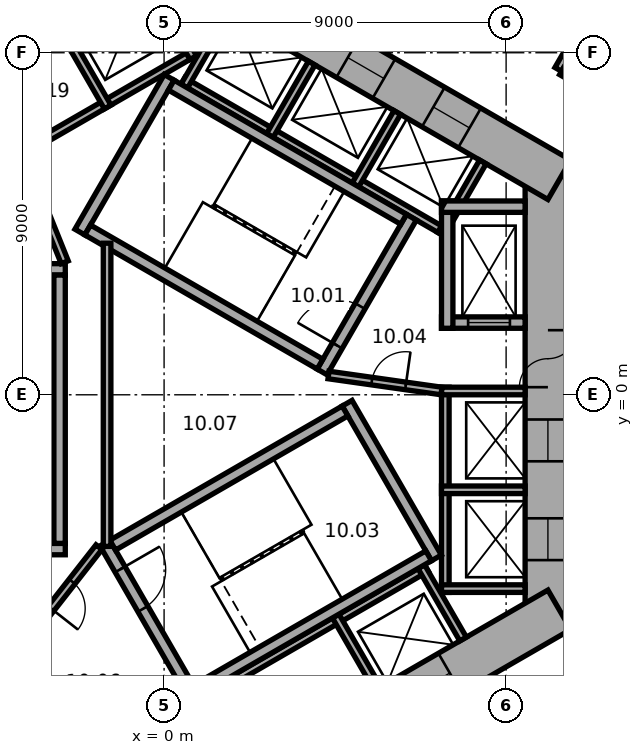
"""IFC4 building model, lengths in metres.
Left out: names, types, materials, properties, quantities, classifications, styles, units other than length and angle.
Written with IfcOpenShell. Run it as: python <this file> out.ifc"""

import sys

from ifc_helpers import new_model, si_unit, direction, frame, frame_2d, origin, place, context, subcontext, project, spatial, rectangle, extrude, element, fill, save


model = new_model("IFC4")
c1 = context("Model", 3, precision=1e-05, world=origin(), true_north=direction((0.0, 1.0)))
c2 = subcontext(c1, "Body", "Model", "MODEL_VIEW")
j1 = project(units=[si_unit("LENGTHUNIT", "METRE"), si_unit("PLANEANGLEUNIT", "RADIAN")], contexts=[c1])
p1 = place(None, origin())
s1 = spatial("IfcSite", under=j1, at=p1, CompositionType="ELEMENT")
p2 = place(p1, origin())
s2 = spatial("IfcBuilding", under=s1, at=p2, CompositionType="ELEMENT")
p3 = place(p2, frame((0.0, 0.0, 53.9)))
s3 = spatial("IfcBuildingStorey", under=s2, at=p3, CompositionType="ELEMENT", Elevation=53.9)
p4 = place(p3, frame((10.1, -6.177, 0.0), z_axis=(0.0, 0.0, 1.0), x_axis=(0.0, 1.0, 0.0)))
e1 = element("IfcWall", 1, at=p4, inside=s3, PredefinedType="SHEAR", context=c2, shape_type="SweptSolid", body=[
    extrude(rectangle(XDim=12.355, YDim=1.2, at=frame_2d((6.177, 0.0))), origin(), (0.0, 0.0, 1.0), 3.3),
])
p5 = place(p4, frame((6.378, 0.0, 0.0)))
e2 = element("IfcOpeningElement", 2, at=p5, cuts=e1, PredefinedType="OPENING", context=c2, shape_type="SweptSolid", body=[
    extrude(rectangle(XDim=1.5, YDim=2.1, at=frame_2d((0.75, 1.05))), frame((0.0, 0.61, 0.0), z_axis=(0.0, -1.0, 0.0), x_axis=(1.0, 0.0, 0.0)), (0.0, 0.0, 1.0), 1.22),
])
p6 = place(p4, frame((1.828, 0.0, 0.0)))
e3 = element("IfcOpeningElement", 3, at=p6, cuts=e1, PredefinedType="OPENING", context=c2, shape_type="SweptSolid", body=[
    extrude(rectangle(XDim=1.1, YDim=2.1, at=frame_2d((0.55, 1.05))), frame((0.0, 0.61, 0.0), z_axis=(0.0, -1.0, 0.0), x_axis=(1.0, 0.0, 0.0)), (0.0, 0.0, 1.0), 1.22),
])
p7 = place(p4, frame((4.427, 0.0, 0.0)))
e4 = element("IfcOpeningElement", 4, at=p7, cuts=e1, PredefinedType="OPENING", context=c2, shape_type="SweptSolid", body=[
    extrude(rectangle(XDim=1.1, YDim=2.1, at=frame_2d((0.55, 1.05))), frame((0.0, 0.61, 0.0), z_axis=(0.0, -1.0, 0.0), x_axis=(1.0, 0.0, 0.0)), (0.0, 0.0, 1.0), 1.22),
])
p8 = place(p3, frame((10.4, 5.658, 0.0), z_axis=(0.0, 0.0, 1.0), x_axis=(-0.866021384402, 0.500006961711, 0.0)))
e5 = element("IfcWall", 5, at=p8, inside=s3, PredefinedType="SHEAR", context=c2, shape_type="SweptSolid", body=[
    extrude(rectangle(XDim=12.355, YDim=1.2, at=frame_2d((6.178, 0.0))), origin(), (0.0, 0.0, 1.0), 3.3),
])
p9 = place(p8, frame((2.728, 0.0, 0.0)))
e6 = element("IfcOpeningElement", 6, at=p9, cuts=e5, PredefinedType="OPENING", context=c2, shape_type="SweptSolid", body=[
    extrude(rectangle(XDim=1.1, YDim=2.1, at=frame_2d((0.55, 1.05))), frame((0.0, 0.61, 0.0), z_axis=(0.0, -1.0, 0.0), x_axis=(1.0, 0.0, 0.0)), (0.0, 0.0, 1.0), 1.22),
])
p10 = place(p8, frame((5.328, 0.0, 0.0)))
e7 = element("IfcOpeningElement", 7, at=p10, cuts=e5, PredefinedType="OPENING", context=c2, shape_type="SweptSolid", body=[
    extrude(rectangle(XDim=1.1, YDim=2.1, at=frame_2d((0.55, 1.05))), frame((0.0, 0.61, 0.0), z_axis=(0.0, -1.0, 0.0), x_axis=(1.0, 0.0, 0.0)), (0.0, 0.0, 1.0), 1.22),
])
p11 = place(p8, frame((7.928, 0.0, 0.0)))
e8 = element("IfcOpeningElement", 8, at=p11, cuts=e5, PredefinedType="OPENING", context=c2, shape_type="SweptSolid", body=[
    extrude(rectangle(XDim=1.1, YDim=2.1, at=frame_2d((0.55, 1.05))), frame((0.0, 0.61, 0.0), z_axis=(0.0, -1.0, 0.0), x_axis=(1.0, 0.0, 0.0)), (0.0, 0.0, 1.0), 1.22),
])
p12 = place(p3, frame((0.3, 11.836, 0.0), z_axis=(0.0, 0.0, 1.0), x_axis=(-0.866021384402, -0.500006961711, 0.0)))
e9 = element("IfcWall", 9, at=p12, inside=s3, PredefinedType="SHEAR", context=c2, shape_type="SweptSolid", body=[
    extrude(rectangle(XDim=12.355, YDim=1.2, at=frame_2d((6.178, 0.0))), origin(), (0.0, 0.0, 1.0), 3.3),
])
p13 = place(p12, frame((6.378, 0.0, 0.0)))
e10 = element("IfcOpeningElement", 10, at=p13, cuts=e9, PredefinedType="OPENING", context=c2, shape_type="SweptSolid", body=[
    extrude(rectangle(XDim=1.5, YDim=2.1, at=frame_2d((0.75, 1.05))), frame((0.0, 0.61, 0.0), z_axis=(0.0, -1.0, 0.0), x_axis=(1.0, 0.0, 0.0)), (0.0, 0.0, 1.0), 1.22),
])
p14 = place(p12, frame((1.828, 0.0, 0.0)))
e11 = element("IfcOpeningElement", 11, at=p14, cuts=e9, PredefinedType="OPENING", context=c2, shape_type="SweptSolid", body=[
    extrude(rectangle(XDim=1.1, YDim=2.1, at=frame_2d((0.55, 1.05))), frame((0.0, 0.61, 0.0), z_axis=(0.0, -1.0, 0.0), x_axis=(1.0, 0.0, 0.0)), (0.0, 0.0, 1.0), 1.22),
])
p15 = place(p3, frame((-10.4, -5.658, 0.0), z_axis=(0.0, 0.0, 1.0), x_axis=(0.866021384402, -0.500006961711, 0.0)))
e12 = element("IfcWall", 12, at=p15, inside=s3, PredefinedType="SHEAR", context=c2, shape_type="SweptSolid", body=[
    extrude(rectangle(XDim=12.355, YDim=1.2, at=frame_2d((6.178, 0.0))), origin(), (0.0, 0.0, 1.0), 3.3),
])
p16 = place(p15, frame((6.378, 0.0, 0.0)))
e13 = element("IfcOpeningElement", 13, at=p16, cuts=e12, PredefinedType="OPENING", context=c2, shape_type="SweptSolid", body=[
    extrude(rectangle(XDim=1.5, YDim=2.1, at=frame_2d((0.75, 1.05))), frame((0.0, 0.61, 0.0), z_axis=(0.0, -1.0, 0.0), x_axis=(1.0, 0.0, 0.0)), (0.0, 0.0, 1.0), 1.22),
])
p17 = place(p15, frame((1.928, 0.0, 0.0)))
e14 = element("IfcOpeningElement", 14, at=p17, cuts=e12, PredefinedType="OPENING", context=c2, shape_type="SweptSolid", body=[
    extrude(rectangle(XDim=0.9, YDim=2.1, at=frame_2d((0.45, 1.05))), frame((0.0, 0.61, 0.0), z_axis=(0.0, -1.0, 0.0), x_axis=(1.0, 0.0, 0.0)), (0.0, 0.0, 1.0), 1.22),
])
p18 = place(p15, frame((4.528, 0.0, 0.0)))
e15 = element("IfcOpeningElement", 15, at=p18, cuts=e12, PredefinedType="OPENING", context=c2, shape_type="SweptSolid", body=[
    extrude(rectangle(XDim=0.9, YDim=2.1, at=frame_2d((0.45, 1.05))), frame((0.0, 0.61, 0.0), z_axis=(0.0, -1.0, 0.0), x_axis=(1.0, 0.0, 0.0)), (0.0, 0.0, 1.0), 1.22),
])
p19 = place(p3, frame((-0.3, -11.836, 0.0), z_axis=(0.0, 0.0, 1.0), x_axis=(0.866021384402, 0.500006961711, 0.0)))
e16 = element("IfcWall", 16, at=p19, inside=s3, PredefinedType="SHEAR", context=c2, shape_type="SweptSolid", body=[
    extrude(rectangle(XDim=12.355, YDim=1.2, at=frame_2d((6.178, 0.0))), origin(), (0.0, 0.0, 1.0), 3.3),
])
p20 = place(p19, frame((4.128, 0.0, 0.0)))
e17 = element("IfcOpeningElement", 17, at=p20, cuts=e16, PredefinedType="OPENING", context=c2, shape_type="SweptSolid", body=[
    extrude(rectangle(XDim=0.9, YDim=2.1, at=frame_2d((0.45, 1.05))), frame((0.0, 0.61, 0.0), z_axis=(0.0, -1.0, 0.0), x_axis=(1.0, 0.0, 0.0)), (0.0, 0.0, 1.0), 1.22),
])
p21 = place(p19, frame((7.928, 0.0, 0.0)))
e18 = element("IfcOpeningElement", 18, at=p21, cuts=e16, PredefinedType="OPENING", context=c2, shape_type="SweptSolid", body=[
    extrude(rectangle(XDim=1.1, YDim=2.1, at=frame_2d((0.55, 1.05))), frame((0.0, 0.61, 0.0), z_axis=(0.0, -1.0, 0.0), x_axis=(1.0, 0.0, 0.0)), (0.0, 0.0, 1.0), 1.22),
])
p22 = place(p3, frame((7.4, -5.2, 0.0), z_axis=(0.0, 0.0, 1.0), x_axis=(0.0, 1.0, 0.0)))
e19 = element("IfcWall", 19, at=p22, inside=s3, PredefinedType="PARTITIONING", context=c2, shape_type="SweptSolid", body=[
    extrude(rectangle(XDim=5.4, YDim=0.2, at=frame_2d((2.7, 0.0))), origin(), (0.0, 0.0, 1.0), 3.05),
])
for number, where, z_axis, x_axis in (
    (20, (7.3, -5.1, 0.0), (0.0, 0.0, 1.0), (1.0, 0.0, 0.0)),
    (21, (7.3, -2.5, 0.0), (0.0, 0.0, 1.0), (1.0, 0.0, 0.0)),
    (22, (7.3, 0.1, 0.0), (0.0, 0.0, 1.0), (1.0, 0.0, 0.0)),
):
    element("IfcWall", number, at=place(p3, frame(where, z_axis=z_axis, x_axis=x_axis)), inside=s3, PredefinedType="PARTITIONING", context=c2, shape_type="SweptSolid", body=[
        extrude(rectangle(XDim=2.2, YDim=0.2, at=frame_2d((1.1, 0.0))), origin(), (0.0, 0.0, 1.0), 3.05),
    ])
p23 = place(p3, frame((7.424, 4.259, 0.0), z_axis=(0.0, 0.0, 1.0), x_axis=(-0.866026010844, 0.49999894854, 0.0)))
e23 = element("IfcWall", 23, at=p23, inside=s3, PredefinedType="PARTITIONING", context=c2, shape_type="SweptSolid", body=[
    extrude(rectangle(XDim=8.0, YDim=0.2, at=frame_2d((4.0, 0.0))), origin(), (0.0, 0.0, 1.0), 3.05),
])
for number, where, z_axis, x_axis in (
    (24, (7.287, 4.222, 0.0), (0.0, 0.0, 1.0), (0.5, 0.866, 0.0)),
    (25, (5.036, 5.522, 0.0), (0.0, 0.0, 1.0), (0.5, 0.866, 0.0)),
    (26, (2.784, 6.822, 0.0), (0.0, 0.0, 1.0), (0.5, 0.866, 0.0)),
    (27, (0.532, 8.122, 0.0), (0.0, 0.0, 1.0), (0.5, 0.866, 0.0)),
):
    element("IfcWall", number, at=place(p3, frame(where, z_axis=z_axis, x_axis=x_axis)), inside=s3, PredefinedType="PARTITIONING", context=c2, shape_type="SweptSolid", body=[
        extrude(rectangle(XDim=2.2, YDim=0.2, at=frame_2d((1.1, 0.0))), origin(), (0.0, 0.0, 1.0), 3.05),
    ])
p24 = place(p3, frame((0.803, 9.009, 0.0), z_axis=(0.0, 0.0, 1.0), x_axis=(-0.866028230842, -0.499995103361, 0.0)))
e28 = element("IfcWall", 28, at=p24, inside=s3, PredefinedType="PARTITIONING", context=c2, shape_type="SweptSolid", body=[
    extrude(rectangle(XDim=5.4, YDim=0.2, at=frame_2d((2.7, 0.0))), origin(), (0.0, 0.0, 1.0), 3.05),
])
p25 = place(p3, frame((0.767, 8.872, 0.0), z_axis=(0.0, 0.0, 1.0), x_axis=(-0.499994660107, 0.866028486751, 0.0)))
e29 = element("IfcWall", 29, at=p25, inside=s3, PredefinedType="PARTITIONING", context=c2, shape_type="SweptSolid", body=[
    extrude(rectangle(XDim=2.2, YDim=0.2, at=frame_2d((1.1, 0.0))), origin(), (0.0, 0.0, 1.0), 3.05),
])
p26 = place(p3, frame((-1.485, 7.572, 0.0), z_axis=(0.0, 0.0, 1.0), x_axis=(-0.50002983664, 0.866008176907, 0.0)))
e30 = element("IfcWall", 30, at=p26, inside=s3, PredefinedType="PARTITIONING", context=c2, shape_type="SweptSolid", body=[
    extrude(rectangle(XDim=2.2, YDim=0.2, at=frame_2d((1.1, 0.0))), origin(), (0.0, 0.0, 1.0), 3.05),
])
p27 = place(p3, frame((-0.024, -8.559, 0.0), z_axis=(0.0, 0.0, 1.0), x_axis=(0.866026010844, 0.49999894854, 0.0)))
e31 = element("IfcWall", 31, at=p27, inside=s3, PredefinedType="PARTITIONING", context=c2, shape_type="SweptSolid", body=[
    extrude(rectangle(XDim=8.0, YDim=0.2, at=frame_2d((4.0, 0.0))), origin(), (0.0, 0.0, 1.0), 3.05),
])
for number, where, z_axis, x_axis in (
    (32, (4.516, -5.822, 0.0), (0.0, 0.0, 1.0), (0.5, -0.866, 0.0)),
    (33, (6.768, -4.522, 0.0), (0.0, 0.0, 1.0), (0.5, -0.866, 0.0)),
):
    element("IfcWall", number, at=place(p3, frame(where, z_axis=z_axis, x_axis=x_axis)), inside=s3, PredefinedType="PARTITIONING", context=c2, shape_type="SweptSolid", body=[
        extrude(rectangle(XDim=2.2, YDim=0.2, at=frame_2d((1.1, 0.0))), origin(), (0.0, 0.0, 1.0), 3.05),
    ])
p28 = place(p3, frame((4.158, 0.602, 0.0), z_axis=(0.0, 0.0, 1.0), x_axis=(0.499977259774, 0.866038532462, 0.0)))
e34 = element("IfcWall", 34, at=p28, inside=s3, PredefinedType="SHEAR", context=c2, shape_type="SweptSolid", body=[
    extrude(rectangle(XDim=4.7, YDim=0.3, at=frame_2d((2.35, 0.0))), origin(), (0.0, 0.0, 1.0), 3.05),
])
p29 = place(p28, frame((0.8, 0.0, 0.0)))
e35 = element("IfcOpeningElement", 35, at=p29, cuts=e34, PredefinedType="OPENING", context=c2, shape_type="SweptSolid", body=[
    extrude(rectangle(XDim=1.2, YDim=2.1, at=frame_2d((0.6, 1.05))), frame((0.0, 0.16, 0.0), z_axis=(0.0, -1.0, 0.0), x_axis=(1.0, 0.0, 0.0)), (0.0, 0.0, 1.0), 0.32),
])
p30 = place(p3, frame((-2.216, 4.282, 0.0), z_axis=(0.0, 0.0, 1.0), x_axis=(0.499977259774, 0.866038532462, 0.0)))
e36 = element("IfcWall", 36, at=p30, inside=s3, PredefinedType="SHEAR", context=c2, shape_type="SweptSolid", body=[
    extrude(rectangle(XDim=4.7, YDim=0.3, at=frame_2d((2.35, 0.0))), origin(), (0.0, 0.0, 1.0), 3.05),
])
for number, where, z_axis, x_axis in (
    (37, (4.103, 0.807, 0.0), (0.0, 0.0, 1.0), (-0.866, 0.5, 0.0)),
    (38, (6.303, 4.617, 0.0), (0.0, 0.0, 1.0), (-0.866, 0.5, 0.0)),
):
    element("IfcWall", number, at=place(p3, frame(where, z_axis=z_axis, x_axis=x_axis)), inside=s3, PredefinedType="SHEAR", context=c2, shape_type="SweptSolid", body=[
        extrude(rectangle(XDim=7.06, YDim=0.3, at=frame_2d((3.53, 0.0))), origin(), (0.0, 0.0, 1.0), 3.05),
    ])
p31 = place(p3, frame((-2.6, 3.3, 0.0), z_axis=(0.0, 0.0, 1.0), x_axis=(-1.0, 0.0, 0.0)))
e39 = element("IfcWall", 39, at=p31, inside=s3, PredefinedType="SHEAR", context=c2, shape_type="SweptSolid", body=[
    extrude(rectangle(XDim=4.7, YDim=0.3, at=frame_2d((2.35, 0.0))), origin(), (0.0, 0.0, 1.0), 3.05),
])
p32 = place(p31, frame((0.8, 0.0, 0.0)))
e40 = element("IfcOpeningElement", 40, at=p32, cuts=e39, PredefinedType="OPENING", context=c2, shape_type="SweptSolid", body=[
    extrude(rectangle(XDim=1.2, YDim=2.1, at=frame_2d((0.6, 1.05))), frame((0.0, 0.16, 0.0), z_axis=(0.0, -1.0, 0.0), x_axis=(1.0, 0.0, 0.0)), (0.0, 0.0, 1.0), 0.32),
])
p33 = place(p3, frame((-2.6, -4.06, 0.0), z_axis=(0.0, 0.0, 1.0), x_axis=(-1.0, 0.0, 0.0)))
e41 = element("IfcWall", 41, at=p33, inside=s3, PredefinedType="SHEAR", context=c2, shape_type="SweptSolid", body=[
    extrude(rectangle(XDim=4.7, YDim=0.3, at=frame_2d((2.35, 0.0))), origin(), (0.0, 0.0, 1.0), 3.05),
])
p34 = place(p3, frame((-2.75, 3.15, 0.0), z_axis=(0.0, 0.0, 1.0), x_axis=(0.0, -1.0, 0.0)))
e42 = element("IfcWall", 42, at=p34, inside=s3, PredefinedType="SHEAR", context=c2, shape_type="SweptSolid", body=[
    extrude(rectangle(XDim=7.06, YDim=0.3, at=frame_2d((3.53, 0.0))), origin(), (0.0, 0.0, 1.0), 3.05),
])
p35 = place(p3, frame((-1.558, -3.902, 0.0), z_axis=(0.0, 0.0, 1.0), x_axis=(0.499977259774, -0.866038532462, 0.0)))
e43 = element("IfcWall", 43, at=p35, inside=s3, PredefinedType="SHEAR", context=c2, shape_type="SweptSolid", body=[
    extrude(rectangle(XDim=4.7, YDim=0.3, at=frame_2d((2.35, 0.0))), origin(), (0.0, 0.0, 1.0), 3.05),
])
p36 = place(p35, frame((0.8, 0.0, 0.0)))
e44 = element("IfcOpeningElement", 44, at=p36, cuts=e43, PredefinedType="OPENING", context=c2, shape_type="SweptSolid", body=[
    extrude(rectangle(XDim=1.2, YDim=2.1, at=frame_2d((0.6, 1.05))), frame((0.0, 0.16, 0.0), z_axis=(0.0, -1.0, 0.0), x_axis=(1.0, 0.0, 0.0)), (0.0, 0.0, 1.0), 0.32),
])
p37 = place(p3, frame((4.816, -0.222, 0.0), z_axis=(0.0, 0.0, 1.0), x_axis=(0.499977259774, -0.866038532462, 0.0)))
e45 = element("IfcWall", 45, at=p37, inside=s3, PredefinedType="SHEAR", context=c2, shape_type="SweptSolid", body=[
    extrude(rectangle(XDim=4.7, YDim=0.3, at=frame_2d((2.35, 0.0))), origin(), (0.0, 0.0, 1.0), 3.05),
])
for number, where, z_axis, x_axis in (
    (46, (-1.353, -3.957, 0.0), (0.0, 0.0, 1.0), (0.866, 0.5, 0.0)),
    (47, (0.847, -7.767, 0.0), (0.0, 0.0, 1.0), (0.866, 0.5, 0.0)),
):
    element("IfcWall", number, at=place(p3, frame(where, z_axis=z_axis, x_axis=x_axis)), inside=s3, PredefinedType="SHEAR", context=c2, shape_type="SweptSolid", body=[
        extrude(rectangle(XDim=7.06, YDim=0.3, at=frame_2d((3.53, 0.0))), origin(), (0.0, 0.0, 1.0), 3.05),
    ])
p38 = place(p3, frame((7.3, 1.9, 0.0), z_axis=(0.0, 0.0, 1.0), x_axis=(1.0, 0.0, 0.0)))
e48 = element("IfcWall", 48, at=p38, inside=s3, PredefinedType="SHEAR", context=c2, shape_type="SweptSolid", body=[
    extrude(rectangle(XDim=2.2, YDim=0.3, at=frame_2d((1.1, 0.0))), origin(), (0.0, 0.0, 1.0), 3.05),
])
p39 = place(p38, frame((0.7, 0.0, 0.0)))
e49 = element("IfcOpeningElement", 49, at=p39, cuts=e48, PredefinedType="OPENING", context=c2, shape_type="SweptSolid", body=[
    extrude(rectangle(XDim=1.1, YDim=2.1, at=frame_2d((0.55, 1.05))), frame((0.0, 0.16, 0.0), z_axis=(0.0, -1.0, 0.0), x_axis=(1.0, 0.0, 0.0)), (0.0, 0.0, 1.0), 0.32),
])
p40 = place(p3, frame((7.45, 1.75, 0.0), z_axis=(0.0, 0.0, 1.0), x_axis=(0.0, 1.0, 0.0)))
e50 = element("IfcWall", 50, at=p40, inside=s3, PredefinedType="SHEAR", context=c2, shape_type="SweptSolid", body=[
    extrude(rectangle(XDim=3.35, YDim=0.3, at=frame_2d((1.675, 0.0))), origin(), (0.0, 0.0, 1.0), 3.05),
])
p41 = place(p3, frame((7.3, 4.95, 0.0), z_axis=(0.0, 0.0, 1.0), x_axis=(1.0, 0.0, 0.0)))
e51 = element("IfcWall", 51, at=p41, inside=s3, PredefinedType="SHEAR", context=c2, shape_type="SweptSolid", body=[
    extrude(rectangle(XDim=2.2, YDim=0.3, at=frame_2d((1.1, 0.0))), origin(), (0.0, 0.0, 1.0), 3.05),
])
p42 = place(p3, frame((4.327, 0.521, 0.0), z_axis=(0.0, 0.0, 1.0), x_axis=(0.990124376366, -0.14019172346, 0.0)))
e52 = element("IfcWall", 52, at=p42, inside=s3, PredefinedType="PARTITIONING", context=c2, shape_type="SweptSolid", body=[
    extrude(rectangle(XDim=3.002, YDim=0.2, at=frame_2d((1.501, 0.0))), origin(), (0.0, 0.0, 1.0), 3.05),
])
p43 = place(p42, frame((1.15, 0.0, 0.0)))
e53 = element("IfcOpeningElement", 53, at=p43, cuts=e52, PredefinedType="OPENING", context=c2, shape_type="SweptSolid", body=[
    extrude(rectangle(XDim=0.9, YDim=2.1, at=frame_2d((0.45, 1.05))), frame((0.0, 0.11, 0.0), z_axis=(0.0, -1.0, 0.0), x_axis=(1.0, 0.0, 0.0)), (0.0, 0.0, 1.0), 0.22),
])
p44 = place(p3, frame((-2.615, 3.487, 0.0), z_axis=(0.0, 0.0, 1.0), x_axis=(-0.373576831041, 0.92759924068, 0.0)))
e54 = element("IfcWall", 54, at=p44, inside=s3, PredefinedType="PARTITIONING", context=c2, shape_type="SweptSolid", body=[
    extrude(rectangle(XDim=3.002, YDim=0.2, at=frame_2d((1.501, 0.0))), origin(), (0.0, 0.0, 1.0), 3.05),
])
p45 = place(p3, frame((-1.712, -4.008, 0.0), z_axis=(0.0, 0.0, 1.0), x_axis=(-0.616549420702, -0.787316208287, 0.0)))
e55 = element("IfcWall", 55, at=p45, inside=s3, PredefinedType="PARTITIONING", context=c2, shape_type="SweptSolid", body=[
    extrude(rectangle(XDim=3.002, YDim=0.2, at=frame_2d((1.501, 0.0))), origin(), (0.0, 0.0, 1.0), 3.05),
])
p46 = place(p45, frame((1.15, 0.0, 0.0)))
e56 = element("IfcOpeningElement", 56, at=p46, cuts=e55, PredefinedType="OPENING", context=c2, shape_type="SweptSolid", body=[
    extrude(rectangle(XDim=0.9, YDim=2.1, at=frame_2d((0.45, 1.05))), frame((0.0, 0.11, 0.0), z_axis=(0.0, -1.0, 0.0), x_axis=(1.0, 0.0, 0.0)), (0.0, 0.0, 1.0), 0.22),
])
p47 = place(p3, frame((-1.5, -3.988, 0.0), z_axis=(0.0, 0.0, 1.0), x_axis=(0.0, 1.0, 0.0)))
e57 = element("IfcWall", 57, at=p47, inside=s3, PredefinedType="PARTITIONING", context=c2, shape_type="SweptSolid", body=[
    extrude(rectangle(XDim=7.977, YDim=0.2, at=frame_2d((3.988, 0.0))), origin(), (0.0, 0.0, 1.0), 3.05),
])
p48 = place(p3, frame((10.371, 8.561, 0.0), z_axis=(0.0, 0.0, 1.0), x_axis=(0.50004290449, 0.866000631449, 0.0)))
e58 = element("IfcWall", 58, at=p48, inside=s3, PredefinedType="PARTITIONING", context=c2, shape_type="SweptSolid", body=[
    extrude(rectangle(XDim=0.901, YDim=0.2, at=frame_2d((0.451, 0.0))), origin(), (0.0, 0.0, 1.0), 3.05),
])
p49 = place(p3, frame((11.566, 7.871, 0.0), z_axis=(0.0, 0.0, 1.0), x_axis=(-0.866004557827, 0.500036104519, 0.0)))
e59 = element("IfcWall", 59, at=p49, inside=s3, PredefinedType="PARTITIONING", context=c2, shape_type="SweptSolid", body=[
    extrude(rectangle(XDim=1.28, YDim=0.2, at=frame_2d((0.64, 0.0))), origin(), (0.0, 0.0, 1.0), 3.05),
])
p50 = place(p5, origin())
e60 = element("IfcDoor", 60, at=p50, inside=s3, OperationType="DOUBLE_DOOR_SINGLE_SWING", PredefinedType="DOOR", context=c2, shape_type="SweptSolid", body=[
    extrude(rectangle(XDim=1.5, YDim=2.1, at=frame_2d((0.75, 1.05))), frame((0.0, 0.025, 0.0), z_axis=(0.0, -1.0, 0.0), x_axis=(1.0, 0.0, 0.0)), (0.0, 0.0, 1.0), 0.05),
])
fill(e2, e60)
p51 = place(p29, origin())
e61 = element("IfcDoor", 61, at=p51, inside=s3, OperationType="SINGLE_SWING_RIGHT", PredefinedType="DOOR", context=c2, shape_type="SweptSolid", body=[
    extrude(rectangle(XDim=1.2, YDim=2.1, at=frame_2d((0.6, 1.05))), frame((0.0, 0.025, 0.0), z_axis=(0.0, -1.0, 0.0), x_axis=(1.0, 0.0, 0.0)), (0.0, 0.0, 1.0), 0.05),
])
fill(e35, e61)
p52 = place(p36, origin())
e62 = element("IfcDoor", 62, at=p52, inside=s3, OperationType="SINGLE_SWING_RIGHT", PredefinedType="DOOR", context=c2, shape_type="SweptSolid", body=[
    extrude(rectangle(XDim=1.2, YDim=2.1, at=frame_2d((0.6, 1.05))), frame((0.0, 0.025, 0.0), z_axis=(0.0, -1.0, 0.0), x_axis=(1.0, 0.0, 0.0)), (0.0, 0.0, 1.0), 0.05),
])
fill(e44, e62)
p53 = place(p43, origin())
e63 = element("IfcDoor", 63, at=p53, inside=s3, OperationType="SINGLE_SWING_LEFT", PredefinedType="DOOR", context=c2, shape_type="SweptSolid", body=[
    extrude(rectangle(XDim=0.9, YDim=2.1, at=frame_2d((0.45, 1.05))), frame((0.0, 0.025, 0.0), z_axis=(0.0, -1.0, 0.0), x_axis=(1.0, 0.0, 0.0)), (0.0, 0.0, 1.0), 0.05),
])
fill(e53, e63)
p54 = place(p46, origin())
e64 = element("IfcDoor", 64, at=p54, inside=s3, OperationType="SINGLE_SWING_LEFT", PredefinedType="DOOR", context=c2, shape_type="SweptSolid", body=[
    extrude(rectangle(XDim=0.9, YDim=2.1, at=frame_2d((0.45, 1.05))), frame((0.0, 0.025, 0.0), z_axis=(0.0, -1.0, 0.0), x_axis=(1.0, 0.0, 0.0)), (0.0, 0.0, 1.0), 0.05),
])
fill(e56, e64)
p55 = place(p39, origin())
e65 = element("IfcDoor", 65, at=p55, inside=s3, OperationType="DOUBLE_DOOR_SLIDING", PredefinedType="DOOR", context=c2, shape_type="SweptSolid", body=[
    extrude(rectangle(XDim=1.1, YDim=2.1, at=frame_2d((0.55, 1.05))), frame((0.0, 0.025, 0.0), z_axis=(0.0, -1.0, 0.0), x_axis=(1.0, 0.0, 0.0)), (0.0, 0.0, 1.0), 0.05),
])
fill(e49, e65)
p56 = place(p6, origin())
e66 = element("IfcDoor", 66, at=p56, inside=s3, OperationType="DOUBLE_DOOR_SLIDING", PredefinedType="DOOR", context=c2, shape_type="SweptSolid", body=[
    extrude(rectangle(XDim=1.1, YDim=2.1, at=frame_2d((0.55, 1.05))), frame((0.0, 0.025, 0.0), z_axis=(0.0, -1.0, 0.0), x_axis=(1.0, 0.0, 0.0)), (0.0, 0.0, 1.0), 0.05),
])
fill(e3, e66)
p57 = place(p7, origin())
e67 = element("IfcDoor", 67, at=p57, inside=s3, OperationType="DOUBLE_DOOR_SLIDING", PredefinedType="DOOR", context=c2, shape_type="SweptSolid", body=[
    extrude(rectangle(XDim=1.1, YDim=2.1, at=frame_2d((0.55, 1.05))), frame((0.0, 0.025, 0.0), z_axis=(0.0, -1.0, 0.0), x_axis=(1.0, 0.0, 0.0)), (0.0, 0.0, 1.0), 0.05),
])
fill(e4, e67)
p58 = place(p9, origin())
e68 = element("IfcDoor", 68, at=p58, inside=s3, OperationType="DOUBLE_DOOR_SLIDING", PredefinedType="DOOR", context=c2, shape_type="SweptSolid", body=[
    extrude(rectangle(XDim=1.1, YDim=2.1, at=frame_2d((0.55, 1.05))), frame((0.0, 0.025, 0.0), z_axis=(0.0, -1.0, 0.0), x_axis=(1.0, 0.0, 0.0)), (0.0, 0.0, 1.0), 0.05),
])
fill(e6, e68)
p59 = place(p10, origin())
e69 = element("IfcDoor", 69, at=p59, inside=s3, OperationType="DOUBLE_DOOR_SLIDING", PredefinedType="DOOR", context=c2, shape_type="SweptSolid", body=[
    extrude(rectangle(XDim=1.1, YDim=2.1, at=frame_2d((0.55, 1.05))), frame((0.0, 0.025, 0.0), z_axis=(0.0, -1.0, 0.0), x_axis=(1.0, 0.0, 0.0)), (0.0, 0.0, 1.0), 0.05),
])
fill(e7, e69)
p60 = place(p21, origin())
e70 = element("IfcDoor", 70, at=p60, inside=s3, OperationType="DOUBLE_DOOR_SLIDING", PredefinedType="DOOR", context=c2, shape_type="SweptSolid", body=[
    extrude(rectangle(XDim=1.1, YDim=2.1, at=frame_2d((0.55, 1.05))), frame((0.0, 0.025, 0.0), z_axis=(0.0, -1.0, 0.0), x_axis=(1.0, 0.0, 0.0)), (0.0, 0.0, 1.0), 0.05),
])
fill(e18, e70)
save(model, sys.argv[1])
